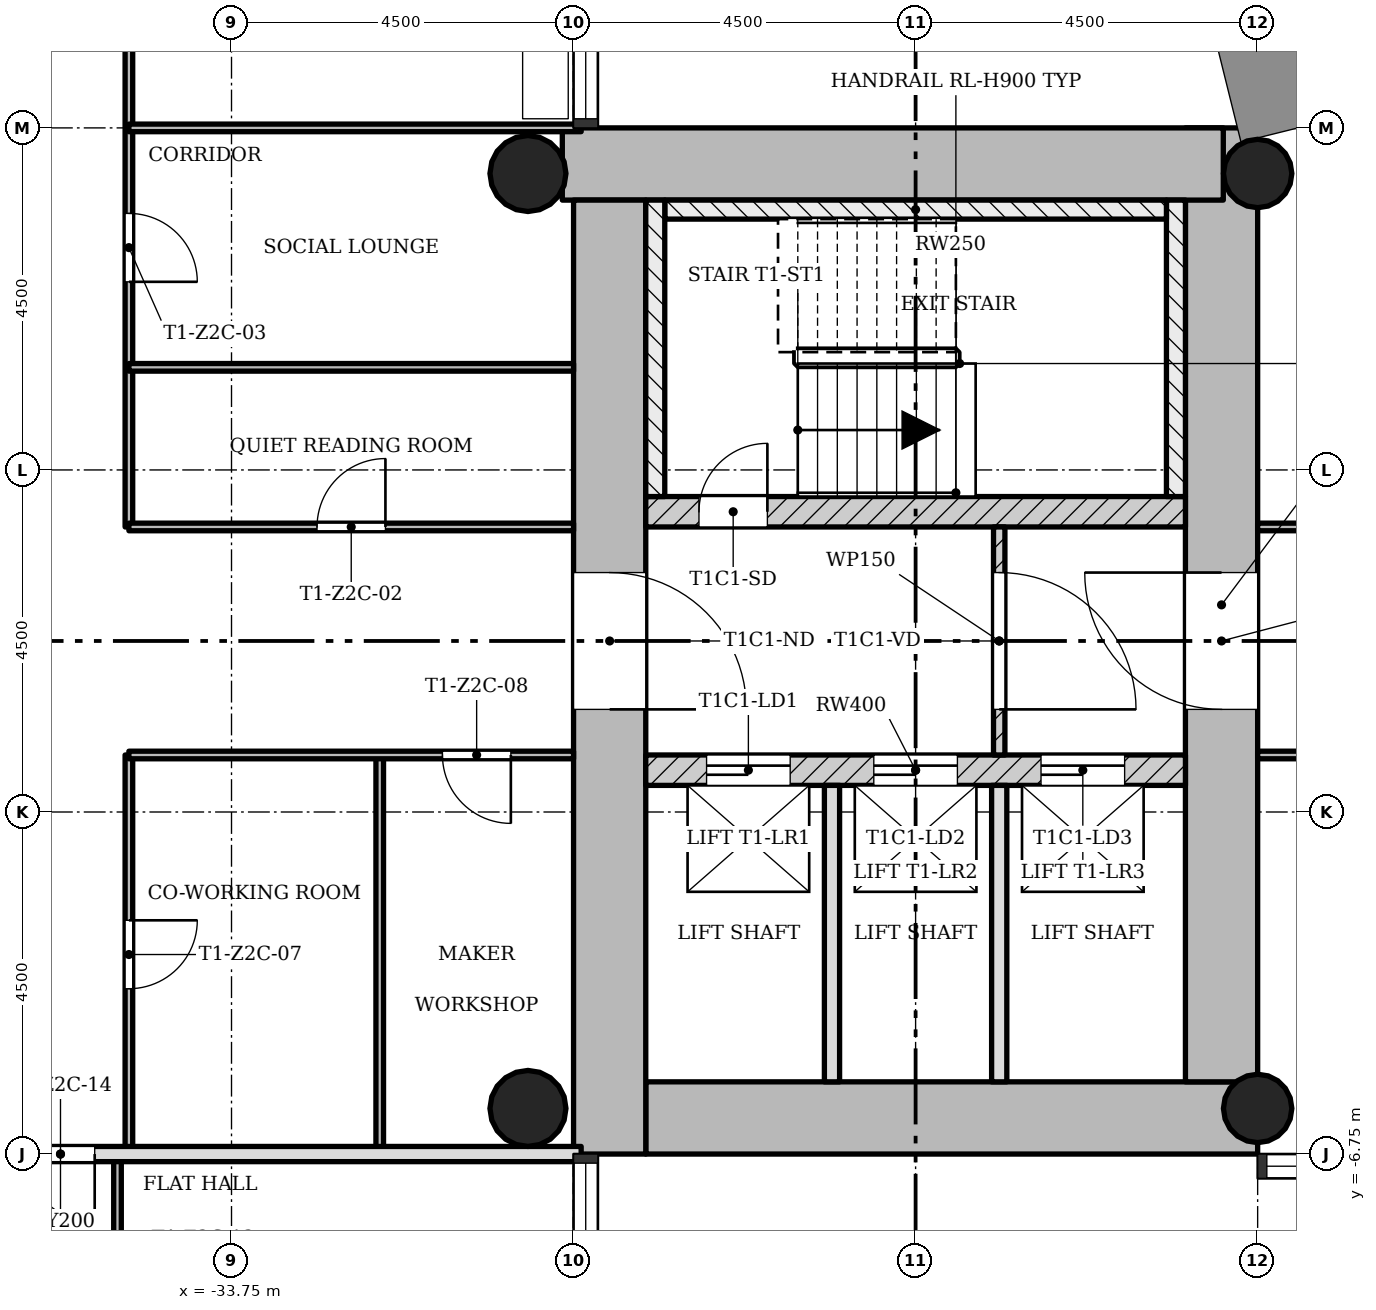
"""IFC4 building model, lengths in metres.
Left out: names, types, materials, properties, quantities, classifications, styles, units other than length and angle.
Written with IfcOpenShell. Run it as: python <this file> out.ifc"""

import sys

from ifc_helpers import new_model, si_unit, direction, frame, frame_2d, origin, origin_2d, place, context, subcontext, project, spatial, rectangle, hollow_circle, extrude, element, fill, save


model = new_model("IFC4")
c1 = context("Model", 3, precision=1e-05, world=origin(), true_north=direction((0.0, 1.0)))
c2 = subcontext(c1, "Body", "Model", "MODEL_VIEW")
j1 = project(units=[si_unit("LENGTHUNIT", "METRE"), si_unit("PLANEANGLEUNIT", "RADIAN")], contexts=[c1])
p1 = place(None, origin())
s1 = spatial("IfcSite", under=j1, at=p1, CompositionType="ELEMENT")
p2 = place(p1, origin())
s2 = spatial("IfcBuilding", under=s1, at=p2, CompositionType="ELEMENT")
p3 = place(p2, frame((0.0, 0.0, 93.6)))
s3 = spatial("IfcBuildingStorey", under=s2, at=p3, CompositionType="ELEMENT", Elevation=93.6)
p4 = place(p3, frame((-28.3, -6.275, 0.0), z_axis=(0.0, 0.0, 1.0), x_axis=(1.0, 0.0, 0.0)))
e1 = element("IfcWall", 1, at=p4, inside=s3, PredefinedType="SHEAR", context=c2, shape_type="SweptSolid", body=[
    extrude(rectangle(XDim=8.05, YDim=0.95, at=frame_2d((4.025, 0.0))), origin(), (0.0, 0.0, 1.0), 3.4),
])
p5 = place(p3, frame((-20.725, -5.8, 0.0), z_axis=(0.0, 0.0, 1.0), x_axis=(0.0, 1.0, 0.0)))
e2 = element("IfcWall", 2, at=p5, inside=s3, PredefinedType="SHEAR", context=c2, shape_type="SweptSolid", body=[
    extrude(rectangle(XDim=12.55, YDim=0.95, at=frame_2d((6.275, 0.0))), origin(), (0.0, 0.0, 1.0), 3.4),
])
p6 = place(p5, frame((4.9, 0.0, 0.0)))
e3 = element("IfcOpeningElement", 3, at=p6, cuts=e2, PredefinedType="OPENING", context=c2, shape_type="SweptSolid", body=[
    extrude(rectangle(XDim=1.8, YDim=2.1, at=frame_2d((0.9, 1.05))), frame((0.0, 0.485, 0.0), z_axis=(0.0, -1.0, 0.0), x_axis=(1.0, 0.0, 0.0)), (0.0, 0.0, 1.0), 0.97),
])
p7 = place(p3, frame((-20.702, 6.275, 0.0), z_axis=(0.0, 0.0, 1.0), x_axis=(-1.0, 0.0, 0.0)))
e4 = element("IfcWall", 4, at=p7, inside=s3, PredefinedType="SHEAR", context=c2, shape_type="SweptSolid", body=[
    extrude(rectangle(XDim=8.696, YDim=0.95, at=frame_2d((4.348, 0.0))), origin(), (0.0, 0.0, 1.0), 3.4),
])
p8 = place(p3, frame((-28.775, 5.8, 0.0), z_axis=(0.0, 0.0, 1.0), x_axis=(0.0, -1.0, 0.0)))
e5 = element("IfcWall", 5, at=p8, inside=s3, PredefinedType="SHEAR", context=c2, shape_type="SweptSolid", body=[
    extrude(rectangle(XDim=12.55, YDim=0.95, at=frame_2d((6.275, 0.0))), origin(), (0.0, 0.0, 1.0), 3.4),
])
p9 = place(p8, frame((4.9, 0.0, 0.0)))
e6 = element("IfcOpeningElement", 6, at=p9, cuts=e5, PredefinedType="OPENING", context=c2, shape_type="SweptSolid", body=[
    extrude(rectangle(XDim=1.8, YDim=2.1, at=frame_2d((0.9, 1.05))), frame((0.0, 0.485, 0.0), z_axis=(0.0, -1.0, 0.0), x_axis=(1.0, 0.0, 0.0)), (0.0, 0.0, 1.0), 0.97),
])
p10 = place(p3, frame((-28.3, -1.7, 0.0), z_axis=(0.0, 0.0, 1.0), x_axis=(1.0, 0.0, 0.0)))
e7 = element("IfcWall", 7, at=p10, inside=s3, PredefinedType="SHEAR", context=c2, shape_type="SweptSolid", body=[
    extrude(rectangle(XDim=7.1, YDim=0.4, at=frame_2d((3.55, 0.0))), origin(), (0.0, 0.0, 1.0), 3.4),
])
p11 = place(p10, frame((0.8, 0.0, 0.0)))
e8 = element("IfcOpeningElement", 8, at=p11, cuts=e7, PredefinedType="OPENING", context=c2, shape_type="SweptSolid", body=[
    extrude(rectangle(XDim=1.1, YDim=2.1, at=frame_2d((0.55, 1.05))), frame((0.0, 0.21, 0.0), z_axis=(0.0, -1.0, 0.0), x_axis=(1.0, 0.0, 0.0)), (0.0, 0.0, 1.0), 0.42),
])
p12 = place(p10, frame((3.0, 0.0, 0.0)))
e9 = element("IfcOpeningElement", 9, at=p12, cuts=e7, PredefinedType="OPENING", context=c2, shape_type="SweptSolid", body=[
    extrude(rectangle(XDim=1.1, YDim=2.1, at=frame_2d((0.55, 1.05))), frame((0.0, 0.21, 0.0), z_axis=(0.0, -1.0, 0.0), x_axis=(1.0, 0.0, 0.0)), (0.0, 0.0, 1.0), 0.42),
])
p13 = place(p10, frame((5.2, 0.0, 0.0)))
e10 = element("IfcOpeningElement", 10, at=p13, cuts=e7, PredefinedType="OPENING", context=c2, shape_type="SweptSolid", body=[
    extrude(rectangle(XDim=1.1, YDim=2.1, at=frame_2d((0.55, 1.05))), frame((0.0, 0.21, 0.0), z_axis=(0.0, -1.0, 0.0), x_axis=(1.0, 0.0, 0.0)), (0.0, 0.0, 1.0), 0.42),
])
p14 = place(p3, frame((-28.3, 1.7, 0.0), z_axis=(0.0, 0.0, 1.0), x_axis=(1.0, 0.0, 0.0)))
e11 = element("IfcWall", 11, at=p14, inside=s3, PredefinedType="SHEAR", context=c2, shape_type="SweptSolid", body=[
    extrude(rectangle(XDim=7.1, YDim=0.4, at=frame_2d((3.55, 0.0))), origin(), (0.0, 0.0, 1.0), 3.4),
])
p15 = place(p14, frame((0.7, 0.0, 0.0)))
e12 = element("IfcOpeningElement", 12, at=p15, cuts=e11, PredefinedType="OPENING", context=c2, shape_type="SweptSolid", body=[
    extrude(rectangle(XDim=0.9, YDim=2.1, at=frame_2d((0.45, 1.05))), frame((0.0, 0.21, 0.0), z_axis=(0.0, -1.0, 0.0), x_axis=(1.0, 0.0, 0.0)), (0.0, 0.0, 1.0), 0.42),
])
for number, where, z_axis, x_axis in (
    (13, (-20.25, -6.15, 0.0), (0.0, 0.0, 1.0), (1.0, 0.0, 0.0)),
    (14, (-20.25, 6.15, 0.0), (0.0, 0.0, 1.0), (1.0, 0.0, 0.0)),
):
    element("IfcColumn", number, at=place(p3, frame(where, z_axis=z_axis, x_axis=x_axis)), inside=s3, PredefinedType="COLUMN", context=c2, shape_type="SweptSolid", body=[
        extrude(hollow_circle(Radius=0.45, WallThickness=0.032, at=origin_2d()), origin(), (0.0, 0.0, 1.0), 3.4),
    ])
for number, where, z_axis, x_axis in (
    (15, (-29.85, -6.15, 0.0), (0.0, 0.0, 1.0), (1.0, 0.0, 0.0)),
    (16, (-29.85, 6.15, 0.0), (0.0, 0.0, 1.0), (1.0, 0.0, 0.0)),
):
    element("IfcColumn", number, at=place(p3, frame(where, z_axis=z_axis, x_axis=x_axis)), inside=s3, PredefinedType="COLUMN", context=c2, shape_type="SweptSolid", body=[
        extrude(hollow_circle(Radius=0.5, WallThickness=0.036, at=origin_2d()), origin(), (0.0, 0.0, 1.0), 3.4),
    ])
p16 = place(p3, frame((-23.65, -1.5, 0.0), z_axis=(0.0, 0.0, 1.0), x_axis=(0.0, 1.0, 0.0)))
e17 = element("IfcWall", 17, at=p16, inside=s3, PredefinedType="PARTITIONING", context=c2, shape_type="SweptSolid", body=[
    extrude(rectangle(XDim=3.0, YDim=0.15, at=frame_2d((1.5, 0.0))), origin(), (0.0, 0.0, 1.0), 3.0),
])
p17 = place(p16, frame((0.6, 0.0, 0.0)))
e18 = element("IfcOpeningElement", 18, at=p17, cuts=e17, PredefinedType="OPENING", context=c2, shape_type="SweptSolid", body=[
    extrude(rectangle(XDim=1.8, YDim=2.1, at=frame_2d((0.9, 1.05))), frame((0.0, 0.085, 0.0), z_axis=(0.0, -1.0, 0.0), x_axis=(1.0, 0.0, 0.0)), (0.0, 0.0, 1.0), 0.17),
])
for number, where, z_axis, x_axis in (
    (19, (-25.85, -5.8, 0.0), (0.0, 0.0, 1.0), (0.0, 1.0, 0.0)),
    (20, (-23.65, -5.8, 0.0), (0.0, 0.0, 1.0), (0.0, 1.0, 0.0)),
):
    element("IfcWall", number, at=place(p3, frame(where, z_axis=z_axis, x_axis=x_axis)), inside=s3, PredefinedType="SOLIDWALL", context=c2, shape_type="SweptSolid", body=[
        extrude(rectangle(XDim=3.9, YDim=0.2, at=frame_2d((1.95, 0.0))), origin(), (0.0, 0.0, 1.0), 3.0),
    ])
p18 = place(p3, frame((-35.25, -11.25, 0.0), z_axis=(0.0, 0.0, 1.0), x_axis=(0.0, 1.0, 0.0)))
e21 = element("IfcWall", 21, at=p18, inside=s3, PredefinedType="PARTITIONING", context=c2, shape_type="SweptSolid", body=[
    extrude(rectangle(XDim=4.5, YDim=0.1, at=frame_2d((2.25, 0.0))), origin(), (0.0, 0.0, 1.0), 3.0),
])
p19 = place(p18, frame((1.8, 0.0, 0.0)))
e22 = element("IfcOpeningElement", 22, at=p19, cuts=e21, PredefinedType="OPENING", context=c2, shape_type="SweptSolid", body=[
    extrude(rectangle(XDim=0.9, YDim=2.1, at=frame_2d((0.45, 1.05))), frame((0.0, 0.06, 0.0), z_axis=(0.0, -1.0, 0.0), x_axis=(1.0, 0.0, 0.0)), (0.0, 0.0, 1.0), 0.12),
])
p20 = place(p3, frame((-35.1, -6.75, 0.0), z_axis=(0.0, 0.0, 1.0), x_axis=(0.0, 1.0, 0.0)))
e23 = element("IfcWall", 23, at=p20, inside=s3, PredefinedType="PARTITIONING", context=c2, shape_type="SweptSolid", body=[
    extrude(rectangle(XDim=5.25, YDim=0.1, at=frame_2d((2.625, 0.0))), origin(), (0.0, 0.0, 1.0), 3.0),
])
p21 = place(p20, frame((2.175, 0.0, 0.0)))
e24 = element("IfcOpeningElement", 24, at=p21, cuts=e23, PredefinedType="OPENING", context=c2, shape_type="SweptSolid", body=[
    extrude(rectangle(XDim=0.9, YDim=2.1, at=frame_2d((0.45, 1.05))), frame((0.0, 0.06, 0.0), z_axis=(0.0, -1.0, 0.0), x_axis=(1.0, 0.0, 0.0)), (0.0, 0.0, 1.0), 0.12),
])
p22 = place(p3, frame((-35.1, 1.5, 0.0), z_axis=(0.0, 0.0, 1.0), x_axis=(0.0, 1.0, 0.0)))
e25 = element("IfcWall", 25, at=p22, inside=s3, PredefinedType="PARTITIONING", context=c2, shape_type="SweptSolid", body=[
    extrude(rectangle(XDim=9.75, YDim=0.1, at=frame_2d((4.875, 0.0))), origin(), (0.0, 0.0, 1.0), 3.0),
])
p23 = place(p22, frame((3.225, 0.0, 0.0)))
e26 = element("IfcOpeningElement", 26, at=p23, cuts=e25, PredefinedType="OPENING", context=c2, shape_type="SweptSolid", body=[
    extrude(rectangle(XDim=0.9, YDim=2.1, at=frame_2d((0.45, 1.05))), frame((0.0, 0.06, 0.0), z_axis=(0.0, -1.0, 0.0), x_axis=(1.0, 0.0, 0.0)), (0.0, 0.0, 1.0), 0.12),
])
p24 = place(p22, frame((7.05, 0.0, 0.0)))
e27 = element("IfcOpeningElement", 27, at=p24, cuts=e25, PredefinedType="OPENING", context=c2, shape_type="SweptSolid", body=[
    extrude(rectangle(XDim=0.9, YDim=2.1, at=frame_2d((0.45, 1.05))), frame((0.0, 0.06, 0.0), z_axis=(0.0, -1.0, 0.0), x_axis=(1.0, 0.0, 0.0)), (0.0, 0.0, 1.0), 0.12),
])
p25 = place(p3, frame((-31.8, -6.75, 0.0), z_axis=(0.0, 0.0, 1.0), x_axis=(0.0, 1.0, 0.0)))
e28 = element("IfcWall", 28, at=p25, inside=s3, PredefinedType="PARTITIONING", context=c2, shape_type="SweptSolid", body=[
    extrude(rectangle(XDim=5.25, YDim=0.1, at=frame_2d((2.625, 0.0))), origin(), (0.0, 0.0, 1.0), 3.0),
])
p26 = place(p3, frame((-42.85, -6.75, 0.0), z_axis=(0.0, 0.0, 1.0), x_axis=(1.0, 0.0, 0.0)))
e29 = element("IfcWall", 29, at=p26, inside=s3, PredefinedType="SOLIDWALL", context=c2, shape_type="SweptSolid", body=[
    extrude(rectangle(XDim=13.7, YDim=0.2, at=frame_2d((6.85, 0.0))), origin(), (0.0, 0.0, 1.0), 3.0),
])
p27 = place(p26, frame((6.4, 0.0, 0.0)))
e30 = element("IfcOpeningElement", 30, at=p27, cuts=e29, PredefinedType="OPENING", context=c2, shape_type="SweptSolid", body=[
    extrude(rectangle(XDim=0.9, YDim=2.1, at=frame_2d((0.45, 1.05))), frame((0.0, 0.11, 0.0), z_axis=(0.0, -1.0, 0.0), x_axis=(1.0, 0.0, 0.0)), (0.0, 0.0, 1.0), 0.22),
])
p28 = place(p3, frame((-35.1, -1.5, 0.0), z_axis=(0.0, 0.0, 1.0), x_axis=(1.0, 0.0, 0.0)))
e31 = element("IfcWall", 31, at=p28, inside=s3, PredefinedType="PARTITIONING", context=c2, shape_type="SweptSolid", body=[
    extrude(rectangle(XDim=5.85, YDim=0.1, at=frame_2d((2.925, 0.0))), origin(), (0.0, 0.0, 1.0), 3.0),
])
p29 = place(p28, frame((4.125, 0.0, 0.0)))
e32 = element("IfcOpeningElement", 32, at=p29, cuts=e31, PredefinedType="OPENING", context=c2, shape_type="SweptSolid", body=[
    extrude(rectangle(XDim=0.9, YDim=2.1, at=frame_2d((0.45, 1.05))), frame((0.0, 0.06, 0.0), z_axis=(0.0, -1.0, 0.0), x_axis=(1.0, 0.0, 0.0)), (0.0, 0.0, 1.0), 0.12),
])
p30 = place(p3, frame((-20.25, -1.5, 0.0), z_axis=(0.0, 0.0, 1.0), x_axis=(1.0, 0.0, 0.0)))
e33 = element("IfcWall", 33, at=p30, inside=s3, PredefinedType="PARTITIONING", context=c2, shape_type="SweptSolid", body=[
    extrude(rectangle(XDim=4.5, YDim=0.1, at=frame_2d((2.25, 0.0))), origin(), (0.0, 0.0, 1.0), 3.0),
])
p31 = place(p30, frame((1.8, 0.0, 0.0)))
e34 = element("IfcOpeningElement", 34, at=p31, cuts=e33, PredefinedType="OPENING", context=c2, shape_type="SweptSolid", body=[
    extrude(rectangle(XDim=0.9, YDim=2.1, at=frame_2d((0.45, 1.05))), frame((0.0, 0.06, 0.0), z_axis=(0.0, -1.0, 0.0), x_axis=(1.0, 0.0, 0.0)), (0.0, 0.0, 1.0), 0.12),
])
p32 = place(p3, frame((-35.1, 1.5, 0.0), z_axis=(0.0, 0.0, 1.0), x_axis=(1.0, 0.0, 0.0)))
e35 = element("IfcWall", 35, at=p32, inside=s3, PredefinedType="PARTITIONING", context=c2, shape_type="SweptSolid", body=[
    extrude(rectangle(XDim=5.85, YDim=0.1, at=frame_2d((2.925, 0.0))), origin(), (0.0, 0.0, 1.0), 3.0),
])
p33 = place(p32, frame((2.475, 0.0, 0.0)))
e36 = element("IfcOpeningElement", 36, at=p33, cuts=e35, PredefinedType="OPENING", context=c2, shape_type="SweptSolid", body=[
    extrude(rectangle(XDim=0.9, YDim=2.1, at=frame_2d((0.45, 1.05))), frame((0.0, 0.06, 0.0), z_axis=(0.0, -1.0, 0.0), x_axis=(1.0, 0.0, 0.0)), (0.0, 0.0, 1.0), 0.12),
])
p34 = place(p3, frame((-20.25, 1.5, 0.0), z_axis=(0.0, 0.0, 1.0), x_axis=(1.0, 0.0, 0.0)))
e37 = element("IfcWall", 37, at=p34, inside=s3, PredefinedType="PARTITIONING", context=c2, shape_type="SweptSolid", body=[
    extrude(rectangle(XDim=4.5, YDim=0.1, at=frame_2d((2.25, 0.0))), origin(), (0.0, 0.0, 1.0), 3.0),
])
p35 = place(p34, frame((1.8, 0.0, 0.0)))
e38 = element("IfcOpeningElement", 38, at=p35, cuts=e37, PredefinedType="OPENING", context=c2, shape_type="SweptSolid", body=[
    extrude(rectangle(XDim=0.9, YDim=2.1, at=frame_2d((0.45, 1.05))), frame((0.0, 0.06, 0.0), z_axis=(0.0, -1.0, 0.0), x_axis=(1.0, 0.0, 0.0)), (0.0, 0.0, 1.0), 0.12),
])
p36 = place(p3, frame((-35.1, 3.6, 0.0), z_axis=(0.0, 0.0, 1.0), x_axis=(1.0, 0.0, 0.0)))
e39 = element("IfcWall", 39, at=p36, inside=s3, PredefinedType="PARTITIONING", context=c2, shape_type="SweptSolid", body=[
    extrude(rectangle(XDim=5.85, YDim=0.1, at=frame_2d((2.925, 0.0))), origin(), (0.0, 0.0, 1.0), 3.0),
])
p37 = place(p3, frame((-35.1, 6.75, 0.0), z_axis=(0.0, 0.0, 1.0), x_axis=(1.0, 0.0, 0.0)))
e40 = element("IfcWall", 40, at=p37, inside=s3, PredefinedType="PARTITIONING", context=c2, shape_type="SweptSolid", body=[
    extrude(rectangle(XDim=5.95, YDim=0.1, at=frame_2d((2.975, 0.0))), origin(), (0.0, 0.0, 1.0), 3.0),
])
p38 = place(p3, frame((-21.325, 1.9, 0.0), z_axis=(0.0, 0.0, 1.0), x_axis=(0.0, 1.0, 0.0)))
e41 = element("IfcWall", 41, at=p38, inside=s3, PredefinedType="SHEAR", context=c2, shape_type="SweptSolid", body=[
    extrude(rectangle(XDim=3.9, YDim=0.25, at=frame_2d((1.95, 0.0))), origin(), (0.0, 0.0, 1.0), 3.4),
])
p39 = place(p3, frame((-28.05, 5.675, 0.0), z_axis=(0.0, 0.0, 1.0), x_axis=(1.0, 0.0, 0.0)))
e42 = element("IfcWall", 42, at=p39, inside=s3, PredefinedType="SHEAR", context=c2, shape_type="SweptSolid", body=[
    extrude(rectangle(XDim=6.6, YDim=0.25, at=frame_2d((3.3, 0.0))), origin(), (0.0, 0.0, 1.0), 3.4),
])
p40 = place(p3, frame((-28.175, 1.9, 0.0), z_axis=(0.0, 0.0, 1.0), x_axis=(0.0, 1.0, 0.0)))
e43 = element("IfcWall", 43, at=p40, inside=s3, PredefinedType="SHEAR", context=c2, shape_type="SweptSolid", body=[
    extrude(rectangle(XDim=3.9, YDim=0.25, at=frame_2d((1.95, 0.0))), origin(), (0.0, 0.0, 1.0), 3.4),
])
p41 = place(p17, origin())
e44 = element("IfcDoor", 44, at=p41, inside=s3, OperationType="SINGLE_SWING_LEFT", PredefinedType="DOOR", context=c2, shape_type="SweptSolid", body=[
    extrude(rectangle(XDim=1.8, YDim=2.1, at=frame_2d((0.9, 1.05))), frame((0.0, 0.025, 0.0), z_axis=(0.0, -1.0, 0.0), x_axis=(1.0, 0.0, 0.0)), (0.0, 0.0, 1.0), 0.05),
])
fill(e18, e44)
p42 = place(p33, origin())
e45 = element("IfcDoor", 45, at=p42, inside=s3, OperationType="SINGLE_SWING_LEFT", PredefinedType="DOOR", context=c2, shape_type="SweptSolid", body=[
    extrude(rectangle(XDim=0.9, YDim=2.1, at=frame_2d((0.45, 1.05))), frame((0.0, 0.025, 0.0), z_axis=(0.0, -1.0, 0.0), x_axis=(1.0, 0.0, 0.0)), (0.0, 0.0, 1.0), 0.05),
])
fill(e36, e45)
p43 = place(p23, origin())
e46 = element("IfcDoor", 46, at=p43, inside=s3, OperationType="SINGLE_SWING_LEFT", PredefinedType="DOOR", context=c2, shape_type="SweptSolid", body=[
    extrude(rectangle(XDim=0.9, YDim=2.1, at=frame_2d((0.45, 1.05))), frame((0.0, 0.025, 0.0), z_axis=(0.0, -1.0, 0.0), x_axis=(1.0, 0.0, 0.0)), (0.0, 0.0, 1.0), 0.05),
])
fill(e26, e46)
p44 = place(p21, origin())
e47 = element("IfcDoor", 47, at=p44, inside=s3, OperationType="SINGLE_SWING_RIGHT", PredefinedType="DOOR", context=c2, shape_type="SweptSolid", body=[
    extrude(rectangle(XDim=0.9, YDim=2.1, at=frame_2d((0.45, 1.05))), frame((0.0, 0.025, 0.0), z_axis=(0.0, -1.0, 0.0), x_axis=(1.0, 0.0, 0.0)), (0.0, 0.0, 1.0), 0.05),
])
fill(e24, e47)
p45 = place(p29, origin())
e48 = element("IfcDoor", 48, at=p45, inside=s3, OperationType="SINGLE_SWING_RIGHT", PredefinedType="DOOR", context=c2, shape_type="SweptSolid", body=[
    extrude(rectangle(XDim=0.9, YDim=2.1, at=frame_2d((0.45, 1.05))), frame((0.0, 0.025, 0.0), z_axis=(0.0, -1.0, 0.0), x_axis=(1.0, 0.0, 0.0)), (0.0, 0.0, 1.0), 0.05),
])
fill(e32, e48)
p46 = place(p27, origin())
e49 = element("IfcDoor", 49, at=p46, inside=s3, OperationType="SINGLE_SWING_RIGHT", PredefinedType="DOOR", context=c2, shape_type="SweptSolid", body=[
    extrude(rectangle(XDim=0.9, YDim=2.1, at=frame_2d((0.45, 1.05))), frame((0.0, 0.025, 0.0), z_axis=(0.0, -1.0, 0.0), x_axis=(1.0, 0.0, 0.0)), (0.0, 0.0, 1.0), 0.05),
])
fill(e30, e49)
p47 = place(p15, origin())
e50 = element("IfcDoor", 50, at=p47, inside=s3, OperationType="SINGLE_SWING_LEFT", PredefinedType="DOOR", context=c2, shape_type="SweptSolid", body=[
    extrude(rectangle(XDim=0.9, YDim=2.1, at=frame_2d((0.45, 1.05))), frame((0.0, 0.025, 0.0), z_axis=(0.0, -1.0, 0.0), x_axis=(1.0, 0.0, 0.0)), (0.0, 0.0, 1.0), 0.05),
])
fill(e12, e50)
p48 = place(p11, origin())
e51 = element("IfcDoor", 51, at=p48, inside=s3, OperationType="SLIDING_TO_LEFT", PredefinedType="DOOR", context=c2, shape_type="SweptSolid", body=[
    extrude(rectangle(XDim=1.1, YDim=2.1, at=frame_2d((0.55, 1.05))), frame((0.0, 0.025, 0.0), z_axis=(0.0, -1.0, 0.0), x_axis=(1.0, 0.0, 0.0)), (0.0, 0.0, 1.0), 0.05),
])
fill(e8, e51)
p49 = place(p12, origin())
e52 = element("IfcDoor", 52, at=p49, inside=s3, OperationType="SLIDING_TO_LEFT", PredefinedType="DOOR", context=c2, shape_type="SweptSolid", body=[
    extrude(rectangle(XDim=1.1, YDim=2.1, at=frame_2d((0.55, 1.05))), frame((0.0, 0.025, 0.0), z_axis=(0.0, -1.0, 0.0), x_axis=(1.0, 0.0, 0.0)), (0.0, 0.0, 1.0), 0.05),
])
fill(e9, e52)
p50 = place(p13, origin())
e53 = element("IfcDoor", 53, at=p50, inside=s3, OperationType="SLIDING_TO_LEFT", PredefinedType="DOOR", context=c2, shape_type="SweptSolid", body=[
    extrude(rectangle(XDim=1.1, YDim=2.1, at=frame_2d((0.55, 1.05))), frame((0.0, 0.025, 0.0), z_axis=(0.0, -1.0, 0.0), x_axis=(1.0, 0.0, 0.0)), (0.0, 0.0, 1.0), 0.05),
])
fill(e10, e53)
p51 = place(p9, origin())
e54 = element("IfcDoor", 54, at=p51, inside=s3, OperationType="SINGLE_SWING_LEFT", PredefinedType="DOOR", context=c2, shape_type="SweptSolid", body=[
    extrude(rectangle(XDim=1.8, YDim=2.1, at=frame_2d((0.9, 1.05))), frame((0.0, 0.025, 0.0), z_axis=(0.0, -1.0, 0.0), x_axis=(1.0, 0.0, 0.0)), (0.0, 0.0, 1.0), 0.05),
])
fill(e6, e54)
p52 = place(p6, origin())
e55 = element("IfcDoor", 55, at=p52, inside=s3, OperationType="SINGLE_SWING_LEFT", PredefinedType="DOOR", context=c2, shape_type="SweptSolid", body=[
    extrude(rectangle(XDim=1.8, YDim=2.1, at=frame_2d((0.9, 1.05))), frame((0.0, 0.025, 0.0), z_axis=(0.0, -1.0, 0.0), x_axis=(1.0, 0.0, 0.0)), (0.0, 0.0, 1.0), 0.05),
])
fill(e3, e55)
save(model, sys.argv[1])
